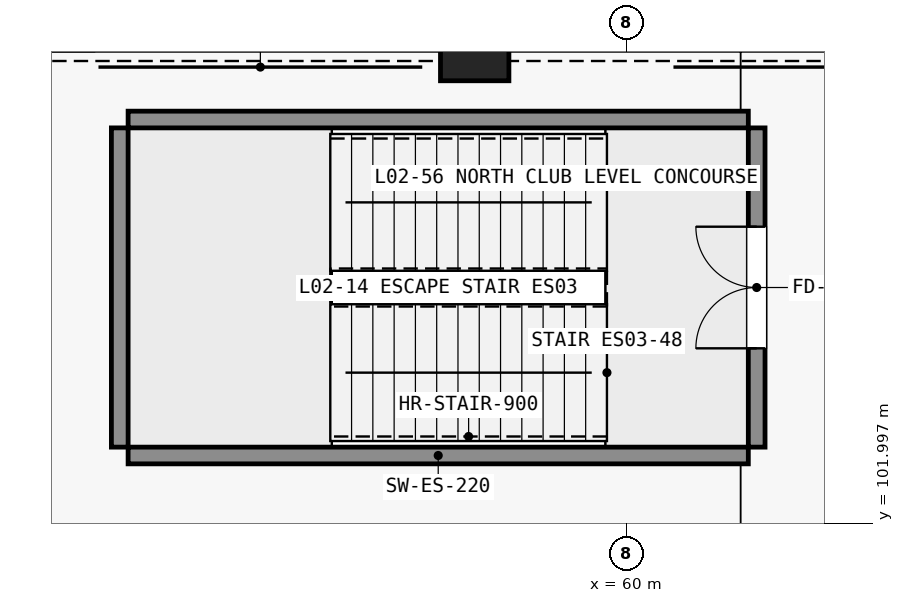
"""IFC4 building model, lengths in metres.
Left out: names, types, materials, properties, quantities, classifications, styles, units other than length and angle.
Written with IfcOpenShell. Run it as: python <this file> out.ifc"""

import sys

from ifc_helpers import new_model, si_unit, direction, frame, frame_2d, origin, origin_2d, place, context, subcontext, project, spatial, rectangle, extrude, element, fill, save


model = new_model("IFC4")
c1 = context("Model", 3, precision=1e-05, world=origin(), true_north=direction((0.0, 1.0)))
c2 = subcontext(c1, "Body", "Model", "MODEL_VIEW")
j1 = project(units=[si_unit("LENGTHUNIT", "METRE"), si_unit("PLANEANGLEUNIT", "RADIAN")], contexts=[c1])
p1 = place(None, origin())
s1 = spatial("IfcSite", under=j1, at=p1, CompositionType="ELEMENT")
p2 = place(p1, origin())
s2 = spatial("IfcBuilding", under=s1, at=p2, CompositionType="ELEMENT")
p3 = place(p2, frame((0.0, 0.0, 11.4)))
s3 = spatial("IfcBuildingStorey", under=s2, at=p3, CompositionType="ELEMENT", Elevation=11.4)
p4 = place(p3, frame((58.0, 108.42, 0.0), z_axis=(0.0, 0.0, 1.0), x_axis=(1.0, 0.0, 0.0)))
e1 = element("IfcColumn", 1, at=p4, inside=s3, PredefinedType="PILASTER", context=c2, shape_type="SweptSolid", body=[
    extrude(rectangle(XDim=0.9, YDim=1.2, at=origin_2d()), origin(), (0.0, 0.0, 1.0), 4.8),
])
for number, where, z_axis, x_axis in (
    (2, (53.44, 102.89, 0.0), (0.0, 0.0, 1.0), (1.0, 0.0, 0.0)),
    (3, (53.44, 107.31, 0.0), (0.0, 0.0, 1.0), (1.0, 0.0, 0.0)),
):
    element("IfcWall", number, at=place(p3, frame(where, z_axis=z_axis, x_axis=x_axis)), inside=s3, PredefinedType="SHEAR", context=c2, shape_type="SweptSolid", body=[
        extrude(rectangle(XDim=8.16, YDim=0.22, at=frame_2d((4.08, 0.0))), origin(), (0.0, 0.0, 1.0), 4.8),
    ])
p5 = place(p3, frame((53.33, 103.0, 0.0), z_axis=(0.0, 0.0, 1.0), x_axis=(0.0, 1.0, 0.0)))
e4 = element("IfcWall", 4, at=p5, inside=s3, PredefinedType="SHEAR", context=c2, shape_type="SweptSolid", body=[
    extrude(rectangle(XDim=4.2, YDim=0.22, at=frame_2d((2.1, 0.0))), origin(), (0.0, 0.0, 1.0), 4.8),
])
p6 = place(p3, frame((61.71, 103.0, 0.0), z_axis=(0.0, 0.0, 1.0), x_axis=(0.0, 1.0, 0.0)))
e5 = element("IfcWall", 5, at=p6, inside=s3, PredefinedType="SHEAR", context=c2, shape_type="SweptSolid", body=[
    extrude(rectangle(XDim=4.2, YDim=0.22, at=frame_2d((2.1, 0.0))), origin(), (0.0, 0.0, 1.0), 4.8),
])
p7 = place(p6, frame((1.3, 0.0, 0.0)))
e6 = element("IfcOpeningElement", 6, at=p7, cuts=e5, PredefinedType="OPENING", context=c2, shape_type="SweptSolid", body=[
    extrude(rectangle(XDim=1.6, YDim=2.2, at=frame_2d((0.8, 1.1))), frame((0.0, 0.12, 0.0), z_axis=(0.0, -1.0, 0.0), x_axis=(1.0, 0.0, 0.0)), (0.0, 0.0, 1.0), 0.24),
])
p8 = place(p7, origin())
e7 = element("IfcDoor", 7, at=p8, inside=s3, OperationType="DOUBLE_DOOR_SINGLE_SWING", PredefinedType="DOOR", context=c2, shape_type="SweptSolid", body=[
    extrude(rectangle(XDim=1.6, YDim=2.2, at=frame_2d((0.8, 1.1))), frame((0.0, 0.025, 0.0), z_axis=(0.0, -1.0, 0.0), x_axis=(1.0, 0.0, 0.0)), (0.0, 0.0, 1.0), 0.05),
])
fill(e6, e7)
save(model, sys.argv[1])
